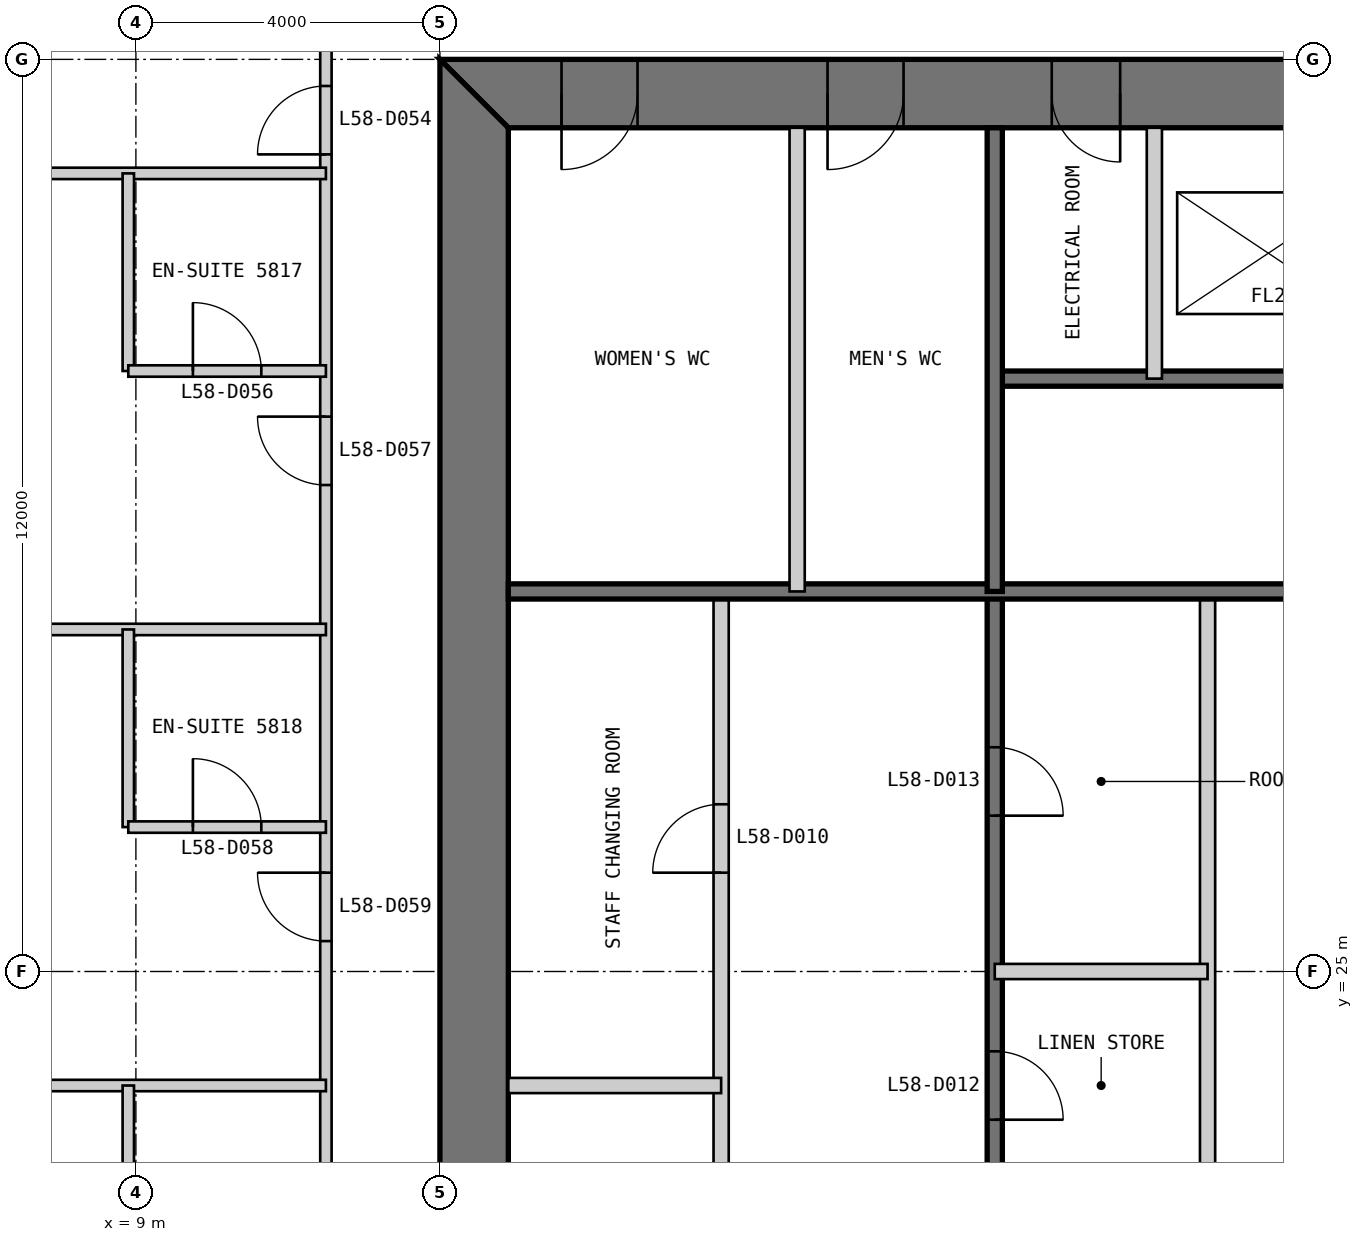
"""IFC4 building model, lengths in metres.
Left out: names, types, materials, properties, quantities, classifications, styles, units other than length and angle.
Written with IfcOpenShell. Run it as: python <this file> out.ifc"""

import sys

from ifc_helpers import new_model, si_unit, direction, frame, frame_2d, origin, place, context, subcontext, project, spatial, polyline, rectangle, outline, extrude, element, fill, save


model = new_model("IFC4")
c1 = context("Model", 3, precision=1e-05, world=origin(), true_north=direction((0.0, 1.0)))
c2 = subcontext(c1, "Body", "Model", "MODEL_VIEW")
j1 = project(units=[si_unit("LENGTHUNIT", "METRE"), si_unit("PLANEANGLEUNIT", "RADIAN")], contexts=[c1])
p1 = place(None, origin())
s1 = spatial("IfcSite", under=j1, at=p1, CompositionType="ELEMENT")
p2 = place(p1, origin())
s2 = spatial("IfcBuilding", under=s1, at=p2, CompositionType="ELEMENT")
p3 = place(p2, frame((0.0, 0.0, 249.2)))
s3 = spatial("IfcBuildingStorey", under=s2, at=p3, CompositionType="ELEMENT", Elevation=249.2)
p4 = place(p3, frame((37.0, 36.55, 0.0), z_axis=(0.0, 0.0, 1.0), x_axis=(-1.0, 0.0, 0.0)))
e1 = element("IfcWall", 1, at=p4, inside=s3, PredefinedType="SHEAR", context=c2, shape_type="SweptSolid", body=[
    extrude(outline(polyline([(0.0, -0.45), (24.0, -0.45), (23.1, 0.45), (0.9, 0.45), (0.0, -0.45)])), origin(), (0.0, 0.0, 1.0), 3.4),
])
p5 = place(p4, frame((4.9, 0.0, 0.0)))
e2 = element("IfcOpeningElement", 2, at=p5, cuts=e1, PredefinedType="OPENING", context=c2, shape_type="SweptSolid", body=[
    extrude(rectangle(XDim=1.0, YDim=2.2, at=frame_2d((0.5, 1.1))), frame((0.0, 0.46, 0.0), z_axis=(0.0, -1.0, 0.0), x_axis=(1.0, 0.0, 0.0)), (0.0, 0.0, 1.0), 0.92),
])
p6 = place(p4, frame((8.9, 0.0, 0.0)))
e3 = element("IfcOpeningElement", 3, at=p6, cuts=e1, PredefinedType="OPENING", context=c2, shape_type="SweptSolid", body=[
    extrude(rectangle(XDim=1.1, YDim=2.2, at=frame_2d((0.55, 1.1))), frame((0.0, 0.46, 0.0), z_axis=(0.0, -1.0, 0.0), x_axis=(1.0, 0.0, 0.0)), (0.0, 0.0, 1.0), 0.92),
])
p7 = place(p4, frame((15.05, 0.0, 0.0)))
e4 = element("IfcOpeningElement", 4, at=p7, cuts=e1, PredefinedType="OPENING", context=c2, shape_type="SweptSolid", body=[
    extrude(rectangle(XDim=0.9, YDim=2.2, at=frame_2d((0.45, 1.1))), frame((0.0, 0.46, 0.0), z_axis=(0.0, -1.0, 0.0), x_axis=(1.0, 0.0, 0.0)), (0.0, 0.0, 1.0), 0.92),
])
p8 = place(p4, frame((17.9, 0.0, 0.0)))
e5 = element("IfcOpeningElement", 5, at=p8, cuts=e1, PredefinedType="OPENING", context=c2, shape_type="SweptSolid", body=[
    extrude(rectangle(XDim=1.0, YDim=2.2, at=frame_2d((0.5, 1.1))), frame((0.0, 0.46, 0.0), z_axis=(0.0, -1.0, 0.0), x_axis=(1.0, 0.0, 0.0)), (0.0, 0.0, 1.0), 0.92),
])
p9 = place(p4, frame((21.4, 0.0, 0.0)))
e6 = element("IfcOpeningElement", 6, at=p9, cuts=e1, PredefinedType="OPENING", context=c2, shape_type="SweptSolid", body=[
    extrude(rectangle(XDim=1.0, YDim=2.2, at=frame_2d((0.5, 1.1))), frame((0.0, 0.46, 0.0), z_axis=(0.0, -1.0, 0.0), x_axis=(1.0, 0.0, 0.0)), (0.0, 0.0, 1.0), 0.92),
])
p10 = place(p3, frame((13.45, 36.1, 0.0), z_axis=(0.0, 0.0, 1.0), x_axis=(0.0, -1.0, 0.0)))
e7 = element("IfcWall", 7, at=p10, inside=s3, PredefinedType="SHEAR", context=c2, shape_type="SweptSolid", body=[
    extrude(outline(polyline([(-0.9, -0.45), (23.1, -0.45), (22.2, 0.45), (0.0, 0.45), (-0.9, -0.45)])), origin(), (0.0, 0.0, 1.0), 3.4),
])
p11 = place(p10, frame((20.2, 0.0, 0.0)))
e8 = element("IfcOpeningElement", 8, at=p11, cuts=e7, PredefinedType="OPENING", context=c2, shape_type="SweptSolid", body=[
    extrude(rectangle(XDim=1.0, YDim=2.2, at=frame_2d((0.5, 1.1))), frame((0.0, 0.46, 0.0), z_axis=(0.0, -1.0, 0.0), x_axis=(1.0, 0.0, 0.0)), (0.0, 0.0, 1.0), 0.92),
])
p12 = place(p10, frame((17.25, 0.0, 0.0)))
e9 = element("IfcOpeningElement", 9, at=p12, cuts=e7, PredefinedType="OPENING", context=c2, shape_type="SweptSolid", body=[
    extrude(rectangle(XDim=0.9, YDim=2.2, at=frame_2d((0.45, 1.1))), frame((0.0, 0.46, 0.0), z_axis=(0.0, -1.0, 0.0), x_axis=(1.0, 0.0, 0.0)), (0.0, 0.0, 1.0), 0.92),
])
p13 = place(p3, frame((16.7, 13.9, 0.0), z_axis=(0.0, 0.0, 1.0), x_axis=(0.0, 1.0, 0.0)))
e10 = element("IfcWall", 10, at=p13, inside=s3, PredefinedType="PARTITIONING", context=c2, shape_type="SweptSolid", body=[
    extrude(rectangle(XDim=16.1, YDim=0.2, at=frame_2d((8.05, 0.0))), origin(), (0.0, 0.0, 1.0), 3.2),
])
p14 = place(p13, frame((7.4, 0.0, 0.0)))
e11 = element("IfcOpeningElement", 11, at=p14, cuts=e10, PredefinedType="OPENING", context=c2, shape_type="SweptSolid", body=[
    extrude(rectangle(XDim=0.9, YDim=2.2, at=frame_2d((0.45, 1.1))), frame((0.0, 0.11, 0.0), z_axis=(0.0, -1.0, 0.0), x_axis=(1.0, 0.0, 0.0)), (0.0, 0.0, 1.0), 0.22),
])
p15 = place(p13, frame((12.4, 0.0, 0.0)))
e12 = element("IfcOpeningElement", 12, at=p15, cuts=e10, PredefinedType="OPENING", context=c2, shape_type="SweptSolid", body=[
    extrude(rectangle(XDim=0.9, YDim=2.2, at=frame_2d((0.45, 1.1))), frame((0.0, 0.11, 0.0), z_axis=(0.0, -1.0, 0.0), x_axis=(1.0, 0.0, 0.0)), (0.0, 0.0, 1.0), 0.22),
])
p16 = place(p3, frame((20.3, 13.9, 0.0), z_axis=(0.0, 0.0, 1.0), x_axis=(0.0, 1.0, 0.0)))
e13 = element("IfcWall", 13, at=p16, inside=s3, PredefinedType="SOLIDWALL", context=c2, shape_type="SweptSolid", body=[
    extrude(rectangle(XDim=16.1, YDim=0.2, at=frame_2d((8.05, 0.0))), origin(), (0.0, 0.0, 1.0), 3.2),
])
p17 = place(p16, frame((6.65, 0.0, 0.0)))
e14 = element("IfcOpeningElement", 14, at=p17, cuts=e13, PredefinedType="OPENING", context=c2, shape_type="SweptSolid", body=[
    extrude(rectangle(XDim=0.9, YDim=2.2, at=frame_2d((0.45, 1.1))), frame((0.0, 0.11, 0.0), z_axis=(0.0, -1.0, 0.0), x_axis=(1.0, 0.0, 0.0)), (0.0, 0.0, 1.0), 0.22),
])
p18 = place(p16, frame((9.15, 0.0, 0.0)))
e15 = element("IfcOpeningElement", 15, at=p18, cuts=e13, PredefinedType="OPENING", context=c2, shape_type="SweptSolid", body=[
    extrude(rectangle(XDim=0.9, YDim=2.2, at=frame_2d((0.45, 1.1))), frame((0.0, 0.11, 0.0), z_axis=(0.0, -1.0, 0.0), x_axis=(1.0, 0.0, 0.0)), (0.0, 0.0, 1.0), 0.22),
])
p19 = place(p16, frame((13.15, 0.0, 0.0)))
e16 = element("IfcOpeningElement", 16, at=p19, cuts=e13, PredefinedType="OPENING", context=c2, shape_type="SweptSolid", body=[
    extrude(rectangle(XDim=0.9, YDim=2.2, at=frame_2d((0.45, 1.1))), frame((0.0, 0.11, 0.0), z_axis=(0.0, -1.0, 0.0), x_axis=(1.0, 0.0, 0.0)), (0.0, 0.0, 1.0), 0.22),
])
p20 = place(p3, frame((23.1, 20.0, 0.0), z_axis=(0.0, 0.0, 1.0), x_axis=(0.0, 1.0, 0.0)))
e17 = element("IfcWall", 17, at=p20, inside=s3, PredefinedType="PARTITIONING", context=c2, shape_type="SweptSolid", body=[
    extrude(rectangle(XDim=10.0, YDim=0.2, at=frame_2d((5.0, 0.0))), origin(), (0.0, 0.0, 1.0), 3.2),
])
for number, where, z_axis, x_axis in (
    (18, (13.9, 23.5, 0.0), (0.0, 0.0, 1.0), (1.0, 0.0, 0.0)),
    (19, (20.3, 25.0, 0.0), (0.0, 0.0, 1.0), (1.0, 0.0, 0.0)),
):
    element("IfcWall", number, at=place(p3, frame(where, z_axis=z_axis, x_axis=x_axis)), inside=s3, PredefinedType="PARTITIONING", context=c2, shape_type="SweptSolid", body=[
        extrude(rectangle(XDim=2.8, YDim=0.2, at=frame_2d((1.4, 0.0))), origin(), (0.0, 0.0, 1.0), 3.2),
    ])
p21 = place(p3, frame((29.7, 32.8, 0.0), z_axis=(0.0, 0.0, 1.0), x_axis=(-1.0, 0.0, 0.0)))
e20 = element("IfcWall", 20, at=p21, inside=s3, PredefinedType="SOLIDWALL", context=c2, shape_type="SweptSolid", body=[
    extrude(rectangle(XDim=9.4, YDim=0.2, at=frame_2d((4.7, 0.0))), origin(), (0.0, 0.0, 1.0), 3.2),
])
p22 = place(p21, frame((0.25, 0.0, 0.0)))
e21 = element("IfcOpeningElement", 21, at=p22, cuts=e20, PredefinedType="OPENING", context=c2, shape_type="SweptSolid", body=[
    extrude(rectangle(XDim=1.0, YDim=2.2, at=frame_2d((0.5, 1.1))), frame((0.0, 0.11, 0.0), z_axis=(0.0, -1.0, 0.0), x_axis=(1.0, 0.0, 0.0)), (0.0, 0.0, 1.0), 0.22),
])
p23 = place(p3, frame((29.7, 30.0, 0.0), z_axis=(0.0, 0.0, 1.0), x_axis=(-1.0, 0.0, 0.0)))
e22 = element("IfcWall", 22, at=p23, inside=s3, PredefinedType="SOLIDWALL", context=c2, shape_type="SweptSolid", body=[
    extrude(rectangle(XDim=15.8, YDim=0.2, at=frame_2d((7.9, 0.0))), origin(), (0.0, 0.0, 1.0), 3.2),
])
p24 = place(p3, frame((22.4, 36.1, 0.0), z_axis=(0.0, 0.0, 1.0), x_axis=(0.0, -1.0, 0.0)))
e23 = element("IfcWall", 23, at=p24, inside=s3, PredefinedType="PARTITIONING", context=c2, shape_type="SweptSolid", body=[
    extrude(rectangle(XDim=3.3, YDim=0.2, at=frame_2d((1.65, 0.0))), origin(), (0.0, 0.0, 1.0), 3.2),
])
p25 = place(p3, frame((20.3, 36.1, 0.0), z_axis=(0.0, 0.0, 1.0), x_axis=(0.0, -1.0, 0.0)))
e24 = element("IfcWall", 24, at=p25, inside=s3, PredefinedType="SOLIDWALL", context=c2, shape_type="SweptSolid", body=[
    extrude(rectangle(XDim=6.1, YDim=0.2, at=frame_2d((3.05, 0.0))), origin(), (0.0, 0.0, 1.0), 3.2),
])
p26 = place(p3, frame((17.7, 36.1, 0.0), z_axis=(0.0, 0.0, 1.0), x_axis=(0.0, -1.0, 0.0)))
e25 = element("IfcWall", 25, at=p26, inside=s3, PredefinedType="PARTITIONING", context=c2, shape_type="SweptSolid", body=[
    extrude(rectangle(XDim=6.1, YDim=0.2, at=frame_2d((3.05, 0.0))), origin(), (0.0, 0.0, 1.0), 3.2),
])
p27 = place(p3, frame((11.5, 38.5, 0.0), z_axis=(0.0, 0.0, 1.0), x_axis=(0.0, -1.0, 0.0)))
e26 = element("IfcWall", 26, at=p27, inside=s3, PredefinedType="PARTITIONING", context=c2, shape_type="SweptSolid", body=[
    extrude(rectangle(XDim=27.0, YDim=0.15, at=frame_2d((13.5, 0.0))), origin(), (0.0, 0.0, 1.0), 3.25),
])
p28 = place(p27, frame((1.85, 0.0, 0.0)))
e27 = element("IfcOpeningElement", 27, at=p28, cuts=e26, PredefinedType="OPENING", context=c2, shape_type="SweptSolid", body=[
    extrude(rectangle(XDim=0.9, YDim=2.1, at=frame_2d((0.45, 1.05))), frame((0.0, 0.085, 0.0), z_axis=(0.0, -1.0, 0.0), x_axis=(1.0, 0.0, 0.0)), (0.0, 0.0, 1.0), 0.17),
])
p29 = place(p27, frame((6.2, 0.0, 0.0)))
e28 = element("IfcOpeningElement", 28, at=p29, cuts=e26, PredefinedType="OPENING", context=c2, shape_type="SweptSolid", body=[
    extrude(rectangle(XDim=0.9, YDim=2.1, at=frame_2d((0.45, 1.05))), frame((0.0, 0.085, 0.0), z_axis=(0.0, -1.0, 0.0), x_axis=(1.0, 0.0, 0.0)), (0.0, 0.0, 1.0), 0.17),
])
p30 = place(p27, frame((12.2, 0.0, 0.0)))
e29 = element("IfcOpeningElement", 29, at=p30, cuts=e26, PredefinedType="OPENING", context=c2, shape_type="SweptSolid", body=[
    extrude(rectangle(XDim=0.9, YDim=2.1, at=frame_2d((0.45, 1.05))), frame((0.0, 0.085, 0.0), z_axis=(0.0, -1.0, 0.0), x_axis=(1.0, 0.0, 0.0)), (0.0, 0.0, 1.0), 0.17),
])
p31 = place(p27, frame((18.2, 0.0, 0.0)))
e30 = element("IfcOpeningElement", 30, at=p31, cuts=e26, PredefinedType="OPENING", context=c2, shape_type="SweptSolid", body=[
    extrude(rectangle(XDim=0.9, YDim=2.1, at=frame_2d((0.45, 1.05))), frame((0.0, 0.085, 0.0), z_axis=(0.0, -1.0, 0.0), x_axis=(1.0, 0.0, 0.0)), (0.0, 0.0, 1.0), 0.17),
])
p32 = place(p27, frame((24.2, 0.0, 0.0)))
e31 = element("IfcOpeningElement", 31, at=p32, cuts=e26, PredefinedType="OPENING", context=c2, shape_type="SweptSolid", body=[
    extrude(rectangle(XDim=0.9, YDim=2.1, at=frame_2d((0.45, 1.05))), frame((0.0, 0.085, 0.0), z_axis=(0.0, -1.0, 0.0), x_axis=(1.0, 0.0, 0.0)), (0.0, 0.0, 1.0), 0.17),
])
p33 = place(p3, frame((0.15, 35.5, 0.0), z_axis=(0.0, 0.0, 1.0), x_axis=(1.0, 0.0, 0.0)))
e32 = element("IfcWall", 32, at=p33, inside=s3, PredefinedType="PARTITIONING", context=c2, shape_type="SweptSolid", body=[
    extrude(rectangle(XDim=11.35, YDim=0.15, at=frame_2d((5.675, 0.0))), origin(), (0.0, 0.0, 1.0), 3.25),
])
p34 = place(p3, frame((8.9, 35.5, 0.0), z_axis=(0.0, 0.0, 1.0), x_axis=(0.0, -1.0, 0.0)))
e33 = element("IfcWall", 33, at=p34, inside=s3, PredefinedType="PARTITIONING", context=c2, shape_type="SweptSolid", body=[
    extrude(rectangle(XDim=2.6, YDim=0.15, at=frame_2d((1.3, 0.0))), origin(), (0.0, 0.0, 1.0), 3.25),
])
p35 = place(p3, frame((8.9, 32.9, 0.0), z_axis=(0.0, 0.0, 1.0), x_axis=(1.0, 0.0, 0.0)))
e34 = element("IfcWall", 34, at=p35, inside=s3, PredefinedType="PARTITIONING", context=c2, shape_type="SweptSolid", body=[
    extrude(rectangle(XDim=2.6, YDim=0.15, at=frame_2d((1.3, 0.0))), origin(), (0.0, 0.0, 1.0), 3.25),
])
p36 = place(p35, frame((0.85, 0.0, 0.0)))
e35 = element("IfcOpeningElement", 35, at=p36, cuts=e34, PredefinedType="OPENING", context=c2, shape_type="SweptSolid", body=[
    extrude(rectangle(XDim=0.9, YDim=2.1, at=frame_2d((0.45, 1.05))), frame((0.0, 0.085, 0.0), z_axis=(0.0, -1.0, 0.0), x_axis=(1.0, 0.0, 0.0)), (0.0, 0.0, 1.0), 0.17),
])
p37 = place(p3, frame((0.15, 29.5, 0.0), z_axis=(0.0, 0.0, 1.0), x_axis=(1.0, 0.0, 0.0)))
e36 = element("IfcWall", 36, at=p37, inside=s3, PredefinedType="PARTITIONING", context=c2, shape_type="SweptSolid", body=[
    extrude(rectangle(XDim=11.35, YDim=0.15, at=frame_2d((5.675, 0.0))), origin(), (0.0, 0.0, 1.0), 3.25),
])
p38 = place(p3, frame((8.9, 29.5, 0.0), z_axis=(0.0, 0.0, 1.0), x_axis=(0.0, -1.0, 0.0)))
e37 = element("IfcWall", 37, at=p38, inside=s3, PredefinedType="PARTITIONING", context=c2, shape_type="SweptSolid", body=[
    extrude(rectangle(XDim=2.6, YDim=0.15, at=frame_2d((1.3, 0.0))), origin(), (0.0, 0.0, 1.0), 3.25),
])
p39 = place(p3, frame((8.9, 26.9, 0.0), z_axis=(0.0, 0.0, 1.0), x_axis=(1.0, 0.0, 0.0)))
e38 = element("IfcWall", 38, at=p39, inside=s3, PredefinedType="PARTITIONING", context=c2, shape_type="SweptSolid", body=[
    extrude(rectangle(XDim=2.6, YDim=0.15, at=frame_2d((1.3, 0.0))), origin(), (0.0, 0.0, 1.0), 3.25),
])
p40 = place(p39, frame((0.85, 0.0, 0.0)))
e39 = element("IfcOpeningElement", 39, at=p40, cuts=e38, PredefinedType="OPENING", context=c2, shape_type="SweptSolid", body=[
    extrude(rectangle(XDim=0.9, YDim=2.1, at=frame_2d((0.45, 1.05))), frame((0.0, 0.085, 0.0), z_axis=(0.0, -1.0, 0.0), x_axis=(1.0, 0.0, 0.0)), (0.0, 0.0, 1.0), 0.17),
])
p41 = place(p3, frame((0.15, 23.5, 0.0), z_axis=(0.0, 0.0, 1.0), x_axis=(1.0, 0.0, 0.0)))
e40 = element("IfcWall", 40, at=p41, inside=s3, PredefinedType="PARTITIONING", context=c2, shape_type="SweptSolid", body=[
    extrude(rectangle(XDim=11.35, YDim=0.15, at=frame_2d((5.675, 0.0))), origin(), (0.0, 0.0, 1.0), 3.25),
])
p42 = place(p3, frame((8.9, 23.5, 0.0), z_axis=(0.0, 0.0, 1.0), x_axis=(0.0, -1.0, 0.0)))
e41 = element("IfcWall", 41, at=p42, inside=s3, PredefinedType="PARTITIONING", context=c2, shape_type="SweptSolid", body=[
    extrude(rectangle(XDim=2.6, YDim=0.15, at=frame_2d((1.3, 0.0))), origin(), (0.0, 0.0, 1.0), 3.25),
])
p43 = place(p15, origin())
e42 = element("IfcDoor", 42, at=p43, inside=s3, OperationType="SINGLE_SWING_LEFT", PredefinedType="DOOR", context=c2, shape_type="SweptSolid", body=[
    extrude(rectangle(XDim=0.9, YDim=2.2, at=frame_2d((0.45, 1.1))), frame((0.0, 0.025, 0.0), z_axis=(0.0, -1.0, 0.0), x_axis=(1.0, 0.0, 0.0)), (0.0, 0.0, 1.0), 0.05),
])
fill(e12, e42)
p44 = place(p18, frame((0.9, 0.0, 0.0), z_axis=(0.0, 0.0, 1.0), x_axis=(-1.0, 0.0, 0.0)))
e43 = element("IfcDoor", 43, at=p44, inside=s3, OperationType="SINGLE_SWING_RIGHT", PredefinedType="DOOR", context=c2, shape_type="SweptSolid", body=[
    extrude(rectangle(XDim=0.9, YDim=2.2, at=frame_2d((0.45, 1.1))), frame((0.0, 0.025, 0.0), z_axis=(0.0, -1.0, 0.0), x_axis=(1.0, 0.0, 0.0)), (0.0, 0.0, 1.0), 0.05),
])
fill(e15, e43)
p45 = place(p19, frame((0.9, 0.0, 0.0), z_axis=(0.0, 0.0, 1.0), x_axis=(-1.0, 0.0, 0.0)))
e44 = element("IfcDoor", 44, at=p45, inside=s3, OperationType="SINGLE_SWING_RIGHT", PredefinedType="DOOR", context=c2, shape_type="SweptSolid", body=[
    extrude(rectangle(XDim=0.9, YDim=2.2, at=frame_2d((0.45, 1.1))), frame((0.0, 0.025, 0.0), z_axis=(0.0, -1.0, 0.0), x_axis=(1.0, 0.0, 0.0)), (0.0, 0.0, 1.0), 0.05),
])
fill(e16, e44)
p46 = place(p7, origin())
e45 = element("IfcDoor", 45, at=p46, inside=s3, OperationType="SINGLE_SWING_LEFT", PredefinedType="DOOR", context=c2, shape_type="SweptSolid", body=[
    extrude(rectangle(XDim=0.9, YDim=2.2, at=frame_2d((0.45, 1.1))), frame((0.0, 0.025, 0.0), z_axis=(0.0, -1.0, 0.0), x_axis=(1.0, 0.0, 0.0)), (0.0, 0.0, 1.0), 0.05),
    extrude(outline(polyline([(0.0, 0.0), (0.04, 0.0), (0.04, 2.16), (0.86, 2.16), (0.86, 0.0), (0.9, 0.0), (0.9, 2.2), (0.0, 2.2), (0.0, 0.0)])), frame((0.0, 0.3, 0.0), z_axis=(0.0, -1.0, 0.0), x_axis=(1.0, 0.0, 0.0)), (0.0, 0.0, 1.0), 0.6),
])
fill(e4, e45)
p47 = place(p8, origin())
e46 = element("IfcDoor", 46, at=p47, inside=s3, OperationType="SINGLE_SWING_RIGHT", PredefinedType="DOOR", context=c2, shape_type="SweptSolid", body=[
    extrude(rectangle(XDim=1.0, YDim=2.2, at=frame_2d((0.5, 1.1))), frame((0.0, 0.025, 0.0), z_axis=(0.0, -1.0, 0.0), x_axis=(1.0, 0.0, 0.0)), (0.0, 0.0, 1.0), 0.05),
    extrude(outline(polyline([(0.0, 0.0), (0.04, 0.0), (0.04, 2.16), (0.96, 2.16), (0.96, 0.0), (1.0, 0.0), (1.0, 2.2), (0.0, 2.2), (0.0, 0.0)])), frame((0.0, 0.3, 0.0), z_axis=(0.0, -1.0, 0.0), x_axis=(1.0, 0.0, 0.0)), (0.0, 0.0, 1.0), 0.6),
])
fill(e5, e46)
p48 = place(p9, origin())
e47 = element("IfcDoor", 47, at=p48, inside=s3, OperationType="SINGLE_SWING_RIGHT", PredefinedType="DOOR", context=c2, shape_type="SweptSolid", body=[
    extrude(rectangle(XDim=1.0, YDim=2.2, at=frame_2d((0.5, 1.1))), frame((0.0, 0.025, 0.0), z_axis=(0.0, -1.0, 0.0), x_axis=(1.0, 0.0, 0.0)), (0.0, 0.0, 1.0), 0.05),
    extrude(outline(polyline([(0.0, 0.0), (0.04, 0.0), (0.04, 2.16), (0.96, 2.16), (0.96, 0.0), (1.0, 0.0), (1.0, 2.2), (0.0, 2.2), (0.0, 0.0)])), frame((0.0, 0.3, 0.0), z_axis=(0.0, -1.0, 0.0), x_axis=(1.0, 0.0, 0.0)), (0.0, 0.0, 1.0), 0.6),
])
fill(e6, e47)
p49 = place(p28, frame((0.9, 0.0, 0.0), z_axis=(0.0, 0.0, 1.0), x_axis=(-1.0, 0.0, 0.0)))
e48 = element("IfcDoor", 48, at=p49, inside=s3, OperationType="SINGLE_SWING_LEFT", PredefinedType="DOOR", context=c2, shape_type="SweptSolid", body=[
    extrude(rectangle(XDim=0.9, YDim=2.1, at=frame_2d((0.45, 1.05))), frame((0.0, 0.025, 0.0), z_axis=(0.0, -1.0, 0.0), x_axis=(1.0, 0.0, 0.0)), (0.0, 0.0, 1.0), 0.05),
])
fill(e27, e48)
p50 = place(p36, origin())
e49 = element("IfcDoor", 49, at=p50, inside=s3, OperationType="SINGLE_SWING_LEFT", PredefinedType="DOOR", context=c2, shape_type="SweptSolid", body=[
    extrude(rectangle(XDim=0.9, YDim=2.1, at=frame_2d((0.45, 1.05))), frame((0.0, 0.025, 0.0), z_axis=(0.0, -1.0, 0.0), x_axis=(1.0, 0.0, 0.0)), (0.0, 0.0, 1.0), 0.05),
])
fill(e35, e49)
p51 = place(p29, frame((0.9, 0.0, 0.0), z_axis=(0.0, 0.0, 1.0), x_axis=(-1.0, 0.0, 0.0)))
e50 = element("IfcDoor", 50, at=p51, inside=s3, OperationType="SINGLE_SWING_RIGHT", PredefinedType="DOOR", context=c2, shape_type="SweptSolid", body=[
    extrude(rectangle(XDim=0.9, YDim=2.1, at=frame_2d((0.45, 1.05))), frame((0.0, 0.025, 0.0), z_axis=(0.0, -1.0, 0.0), x_axis=(1.0, 0.0, 0.0)), (0.0, 0.0, 1.0), 0.05),
])
fill(e28, e50)
p52 = place(p40, origin())
e51 = element("IfcDoor", 51, at=p52, inside=s3, OperationType="SINGLE_SWING_LEFT", PredefinedType="DOOR", context=c2, shape_type="SweptSolid", body=[
    extrude(rectangle(XDim=0.9, YDim=2.1, at=frame_2d((0.45, 1.05))), frame((0.0, 0.025, 0.0), z_axis=(0.0, -1.0, 0.0), x_axis=(1.0, 0.0, 0.0)), (0.0, 0.0, 1.0), 0.05),
])
fill(e39, e51)
p53 = place(p30, frame((0.9, 0.0, 0.0), z_axis=(0.0, 0.0, 1.0), x_axis=(-1.0, 0.0, 0.0)))
e52 = element("IfcDoor", 52, at=p53, inside=s3, OperationType="SINGLE_SWING_RIGHT", PredefinedType="DOOR", context=c2, shape_type="SweptSolid", body=[
    extrude(rectangle(XDim=0.9, YDim=2.1, at=frame_2d((0.45, 1.05))), frame((0.0, 0.025, 0.0), z_axis=(0.0, -1.0, 0.0), x_axis=(1.0, 0.0, 0.0)), (0.0, 0.0, 1.0), 0.05),
])
fill(e29, e52)
save(model, sys.argv[1])
